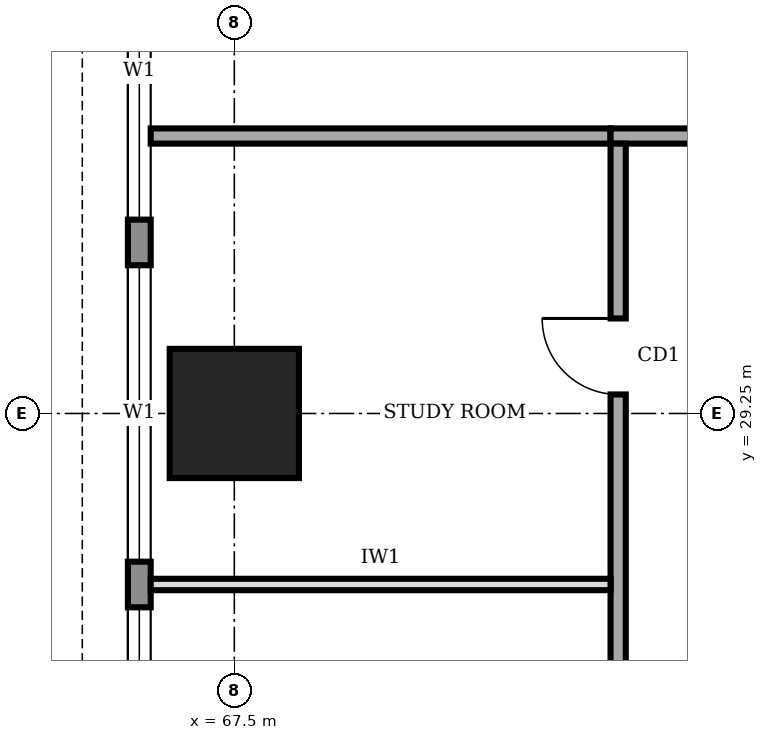
"""IFC4 building model, lengths in metres.
Left out: names, types, materials, properties, quantities, classifications, styles, units other than length and angle.
Written with IfcOpenShell. Run it as: python <this file> out.ifc"""

import sys

from ifc_helpers import new_model, si_unit, direction, frame, frame_2d, origin, origin_2d, place, context, subcontext, project, spatial, rectangle, extrude, element, fill, save


model = new_model("IFC4")
c1 = context("Model", 3, precision=1e-05, world=origin(), true_north=direction((0.0, 1.0)))
c2 = subcontext(c1, "Body", "Model", "MODEL_VIEW")
j1 = project(units=[si_unit("LENGTHUNIT", "METRE"), si_unit("PLANEANGLEUNIT", "RADIAN")], contexts=[c1])
p1 = place(None, origin())
s1 = spatial("IfcSite", under=j1, at=p1, CompositionType="ELEMENT")
p2 = place(p1, origin())
s2 = spatial("IfcBuilding", under=s1, at=p2, CompositionType="ELEMENT")
p3 = place(p2, frame((0.0, 0.0, 217.0)))
s3 = spatial("IfcBuildingStorey", under=s2, at=p3, CompositionType="ELEMENT", Elevation=217.0)
p4 = place(p3, frame((67.5, 29.25, 0.0), z_axis=(0.0, 0.0, 1.0), x_axis=(1.0, 0.0, 0.0)))
e1 = element("IfcColumn", 1, at=p4, inside=s3, PredefinedType="COLUMN", context=c2, shape_type="SweptSolid", body=[
    extrude(rectangle(XDim=1.7, YDim=1.7, at=origin_2d()), origin(), (0.0, 0.0, 1.0), 4.0),
])
p5 = place(p3, frame((66.25, 37.18, 0.0), z_axis=(0.0, 0.0, 1.0), x_axis=(0.0, -1.0, 0.0)))
e2 = element("IfcWall", 2, at=p5, inside=s3, PredefinedType="STANDARD", context=c2, shape_type="SweptSolid", body=[
    extrude(rectangle(XDim=33.86, YDim=0.3, at=frame_2d((16.93, 0.0))), origin(), (0.0, 0.0, 1.0), 3.75),
])
p6 = place(p5, frame((28.48, 0.0, 0.9)))
e3 = element("IfcOpeningElement", 3, at=p6, cuts=e2, PredefinedType="OPENING", context=c2, shape_type="SweptSolid", body=[
    extrude(rectangle(XDim=3.9, YDim=2.2, at=frame_2d((1.95, 1.1))), frame((0.0, 0.16, 0.0), z_axis=(0.0, -1.0, 0.0), x_axis=(1.0, 0.0, 0.0)), (0.0, 0.0, 1.0), 0.32),
])
p7 = place(p5, frame((23.98, 0.0, 0.9)))
e4 = element("IfcOpeningElement", 4, at=p7, cuts=e2, PredefinedType="OPENING", context=c2, shape_type="SweptSolid", body=[
    extrude(rectangle(XDim=3.9, YDim=2.2, at=frame_2d((1.95, 1.1))), frame((0.0, 0.16, 0.0), z_axis=(0.0, -1.0, 0.0), x_axis=(1.0, 0.0, 0.0)), (0.0, 0.0, 1.0), 0.32),
])
p8 = place(p5, frame((19.48, 0.0, 0.9)))
e5 = element("IfcOpeningElement", 5, at=p8, cuts=e2, PredefinedType="OPENING", context=c2, shape_type="SweptSolid", body=[
    extrude(rectangle(XDim=3.9, YDim=2.2, at=frame_2d((1.95, 1.1))), frame((0.0, 0.16, 0.0), z_axis=(0.0, -1.0, 0.0), x_axis=(1.0, 0.0, 0.0)), (0.0, 0.0, 1.0), 0.32),
])
p9 = place(p5, frame((14.98, 0.0, 0.9)))
e6 = element("IfcOpeningElement", 6, at=p9, cuts=e2, PredefinedType="OPENING", context=c2, shape_type="SweptSolid", body=[
    extrude(rectangle(XDim=3.9, YDim=2.2, at=frame_2d((1.95, 1.1))), frame((0.0, 0.16, 0.0), z_axis=(0.0, -1.0, 0.0), x_axis=(1.0, 0.0, 0.0)), (0.0, 0.0, 1.0), 0.32),
])
p10 = place(p5, frame((10.48, 0.0, 0.9)))
e7 = element("IfcOpeningElement", 7, at=p10, cuts=e2, PredefinedType="OPENING", context=c2, shape_type="SweptSolid", body=[
    extrude(rectangle(XDim=3.9, YDim=2.2, at=frame_2d((1.95, 1.1))), frame((0.0, 0.16, 0.0), z_axis=(0.0, -1.0, 0.0), x_axis=(1.0, 0.0, 0.0)), (0.0, 0.0, 1.0), 0.32),
])
p11 = place(p5, frame((5.98, 0.0, 0.9)))
e8 = element("IfcOpeningElement", 8, at=p11, cuts=e2, PredefinedType="OPENING", context=c2, shape_type="SweptSolid", body=[
    extrude(rectangle(XDim=3.9, YDim=2.2, at=frame_2d((1.95, 1.1))), frame((0.0, 0.16, 0.0), z_axis=(0.0, -1.0, 0.0), x_axis=(1.0, 0.0, 0.0)), (0.0, 0.0, 1.0), 0.32),
])
p12 = place(p5, frame((1.48, 0.0, 0.9)))
e9 = element("IfcOpeningElement", 9, at=p12, cuts=e2, PredefinedType="OPENING", context=c2, shape_type="SweptSolid", body=[
    extrude(rectangle(XDim=3.9, YDim=2.2, at=frame_2d((1.95, 1.1))), frame((0.0, 0.16, 0.0), z_axis=(0.0, -1.0, 0.0), x_axis=(1.0, 0.0, 0.0)), (0.0, 0.0, 1.0), 0.32),
])
p13 = place(p3, frame((89.35, 32.9, 0.0), z_axis=(0.0, 0.0, 1.0), x_axis=(-1.0, 0.0, 0.0)))
e10 = element("IfcWall", 10, at=p13, inside=s3, PredefinedType="SOLIDWALL", context=c2, shape_type="SweptSolid", body=[
    extrude(rectangle(XDim=16.9, YDim=0.2, at=frame_2d((8.45, 0.0))), origin(), (0.0, 0.0, 1.0), 3.75),
])
p14 = place(p13, frame((14.375, 0.0, 0.0)))
e11 = element("IfcOpeningElement", 11, at=p14, cuts=e10, PredefinedType="OPENING", context=c2, shape_type="SweptSolid", body=[
    extrude(rectangle(XDim=1.0, YDim=2.1, at=frame_2d((0.5, 1.05))), frame((0.0, 0.11, 0.0), z_axis=(0.0, -1.0, 0.0), x_axis=(1.0, 0.0, 0.0)), (0.0, 0.0, 1.0), 0.22),
])
p15 = place(p13, frame((1.325, 0.0, 0.0)))
e12 = element("IfcOpeningElement", 12, at=p15, cuts=e10, PredefinedType="OPENING", context=c2, shape_type="SweptSolid", body=[
    extrude(rectangle(XDim=1.0, YDim=2.1, at=frame_2d((0.5, 1.05))), frame((0.0, 0.11, 0.0), z_axis=(0.0, -1.0, 0.0), x_axis=(1.0, 0.0, 0.0)), (0.0, 0.0, 1.0), 0.22),
])
p16 = place(p3, frame((72.55, 32.8, 0.0), z_axis=(0.0, 0.0, 1.0), x_axis=(0.0, -1.0, 0.0)))
e13 = element("IfcWall", 13, at=p16, inside=s3, PredefinedType="SOLIDWALL", context=c2, shape_type="SweptSolid", body=[
    extrude(rectangle(XDim=23.8, YDim=0.2, at=frame_2d((11.9, 0.0))), origin(), (0.0, 0.0, 1.0), 3.75),
])
p17 = place(p16, frame((21.05, 0.0, 0.0)))
e14 = element("IfcOpeningElement", 14, at=p17, cuts=e13, PredefinedType="OPENING", context=c2, shape_type="SweptSolid", body=[
    extrude(rectangle(XDim=1.0, YDim=2.1, at=frame_2d((0.5, 1.05))), frame((0.0, 0.11, 0.0), z_axis=(0.0, -1.0, 0.0), x_axis=(1.0, 0.0, 0.0)), (0.0, 0.0, 1.0), 0.22),
])
p18 = place(p16, frame((14.3, 0.0, 0.0)))
e15 = element("IfcOpeningElement", 15, at=p18, cuts=e13, PredefinedType="OPENING", context=c2, shape_type="SweptSolid", body=[
    extrude(rectangle(XDim=1.0, YDim=2.1, at=frame_2d((0.5, 1.05))), frame((0.0, 0.11, 0.0), z_axis=(0.0, -1.0, 0.0), x_axis=(1.0, 0.0, 0.0)), (0.0, 0.0, 1.0), 0.22),
])
p19 = place(p16, frame((7.55, 0.0, 0.0)))
e16 = element("IfcOpeningElement", 16, at=p19, cuts=e13, PredefinedType="OPENING", context=c2, shape_type="SweptSolid", body=[
    extrude(rectangle(XDim=1.0, YDim=2.1, at=frame_2d((0.5, 1.05))), frame((0.0, 0.11, 0.0), z_axis=(0.0, -1.0, 0.0), x_axis=(1.0, 0.0, 0.0)), (0.0, 0.0, 1.0), 0.22),
])
p20 = place(p16, frame((2.3, 0.0, 0.0)))
e17 = element("IfcOpeningElement", 17, at=p20, cuts=e13, PredefinedType="OPENING", context=c2, shape_type="SweptSolid", body=[
    extrude(rectangle(XDim=1.0, YDim=2.1, at=frame_2d((0.5, 1.05))), frame((0.0, 0.11, 0.0), z_axis=(0.0, -1.0, 0.0), x_axis=(1.0, 0.0, 0.0)), (0.0, 0.0, 1.0), 0.22),
])
p21 = place(p3, frame((66.4, 32.9, 0.0), z_axis=(0.0, 0.0, 1.0), x_axis=(1.0, 0.0, 0.0)))
e18 = element("IfcWall", 18, at=p21, inside=s3, PredefinedType="SOLIDWALL", context=c2, shape_type="SweptSolid", body=[
    extrude(rectangle(XDim=6.05, YDim=0.2, at=frame_2d((3.025, 0.0))), origin(), (0.0, 0.0, 1.0), 3.75),
])
p22 = place(p3, frame((66.4, 27.0, 0.0), z_axis=(0.0, 0.0, 1.0), x_axis=(1.0, 0.0, 0.0)))
e19 = element("IfcWall", 19, at=p22, inside=s3, PredefinedType="PARTITIONING", context=c2, shape_type="SweptSolid", body=[
    extrude(rectangle(XDim=6.05, YDim=0.15, at=frame_2d((3.025, 0.0))), origin(), (0.0, 0.0, 1.0), 3.75),
])
p23 = place(p10, origin())
e20 = element("IfcWindow", 20, at=p23, inside=s3, PartitioningType="SINGLE_PANEL", PredefinedType="WINDOW", context=c2, shape_type="SweptSolid", body=[
    extrude(rectangle(XDim=3.9, YDim=2.2, at=frame_2d((1.95, 1.1))), frame((0.0, 0.03, 0.0), z_axis=(0.0, -1.0, 0.0), x_axis=(1.0, 0.0, 0.0)), (0.0, 0.0, 1.0), 0.06),
])
fill(e7, e20)
p24 = place(p11, origin())
e21 = element("IfcWindow", 21, at=p24, inside=s3, PartitioningType="SINGLE_PANEL", PredefinedType="WINDOW", context=c2, shape_type="SweptSolid", body=[
    extrude(rectangle(XDim=3.9, YDim=2.2, at=frame_2d((1.95, 1.1))), frame((0.0, 0.03, 0.0), z_axis=(0.0, -1.0, 0.0), x_axis=(1.0, 0.0, 0.0)), (0.0, 0.0, 1.0), 0.06),
])
fill(e8, e21)
p25 = place(p12, origin())
e22 = element("IfcWindow", 22, at=p25, inside=s3, PartitioningType="SINGLE_PANEL", PredefinedType="WINDOW", context=c2, shape_type="SweptSolid", body=[
    extrude(rectangle(XDim=3.9, YDim=2.2, at=frame_2d((1.95, 1.1))), frame((0.0, 0.03, 0.0), z_axis=(0.0, -1.0, 0.0), x_axis=(1.0, 0.0, 0.0)), (0.0, 0.0, 1.0), 0.06),
])
fill(e9, e22)
p26 = place(p20, frame((1.0, 0.0, 0.0), z_axis=(0.0, 0.0, 1.0), x_axis=(-1.0, 0.0, 0.0)))
e23 = element("IfcDoor", 23, at=p26, inside=s3, OperationType="SINGLE_SWING_RIGHT", PredefinedType="DOOR", context=c2, shape_type="SweptSolid", body=[
    extrude(rectangle(XDim=1.0, YDim=2.1, at=frame_2d((0.5, 1.05))), frame((0.0, 0.025, 0.0), z_axis=(0.0, -1.0, 0.0), x_axis=(1.0, 0.0, 0.0)), (0.0, 0.0, 1.0), 0.05),
])
fill(e17, e23)
save(model, sys.argv[1])
